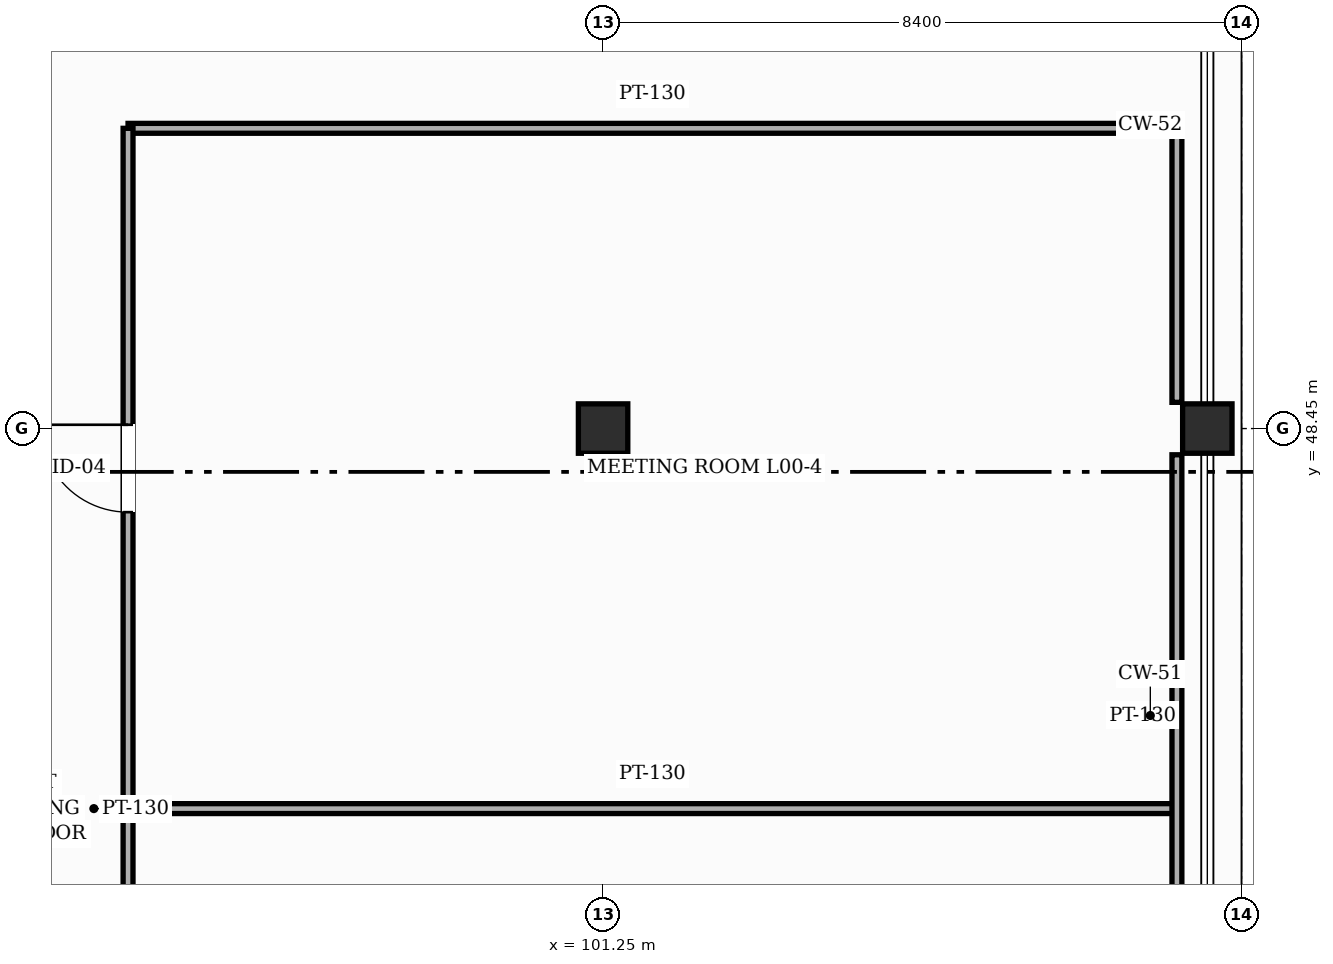
"""IFC4 building model, lengths in metres.
Left out: names, types, materials, properties, quantities, classifications, styles, units other than length and angle.
Written with IfcOpenShell. Run it as: python <this file> out.ifc"""

import sys

from ifc_helpers import new_model, si_unit, direction, frame, frame_2d, origin, origin_2d, place, context, subcontext, project, spatial, rectangle, hollow_rectangle, extrude, element, fill, save


model = new_model("IFC4")
c1 = context("Model", 3, precision=1e-05, world=origin(), true_north=direction((0.0, 1.0)))
c2 = subcontext(c1, "Body", "Model", "MODEL_VIEW")
j1 = project(units=[si_unit("LENGTHUNIT", "METRE"), si_unit("PLANEANGLEUNIT", "RADIAN")], contexts=[c1])
p1 = place(None, origin())
s1 = spatial("IfcSite", under=j1, at=p1, CompositionType="ELEMENT")
p2 = place(p1, origin())
s2 = spatial("IfcBuilding", under=s1, at=p2, CompositionType="ELEMENT")
p3 = place(p2, origin())
s3 = spatial("IfcBuildingStorey", under=s2, at=p3, CompositionType="ELEMENT", Elevation=0.0)
for number, where, z_axis, x_axis in (
    (1, (101.25, 48.45, 0.0), (0.0, 0.0, 1.0), (1.0, 0.0, 0.0)),
    (2, (109.2, 48.45, 0.0), (0.0, 0.0, 1.0), (1.0, 0.0, 0.0)),
):
    element("IfcColumn", number, at=place(p3, frame(where, z_axis=z_axis, x_axis=x_axis)), inside=s3, PredefinedType="COLUMN", context=c2, shape_type="SweptSolid", body=[
        extrude(hollow_rectangle(XDim=0.65, YDim=0.65, WallThickness=0.025, InnerFilletRadius=0.025, OuterFilletRadius=0.05, at=origin_2d()), origin(), (0.0, 0.0, 1.0), 5.4),
    ])
p4 = place(p3, frame((95.0, 43.45, 0.0), z_axis=(0.0, 0.0, 1.0), x_axis=(1.0, 0.0, 0.0)))
e3 = element("IfcWall", 3, at=p4, inside=s3, PredefinedType="PARTITIONING", context=c2, shape_type="SweptSolid", body=[
    extrude(rectangle(XDim=13.8, YDim=0.13, at=frame_2d((6.9, 0.0))), origin(), (0.0, 0.0, 1.0), 5.135),
])
p5 = place(p3, frame((95.0, 52.4, 0.0), z_axis=(0.0, 0.0, 1.0), x_axis=(1.0, 0.0, 0.0)))
e4 = element("IfcWall", 4, at=p5, inside=s3, PredefinedType="PARTITIONING", context=c2, shape_type="SweptSolid", body=[
    extrude(rectangle(XDim=13.8, YDim=0.13, at=frame_2d((6.9, 0.0))), origin(), (0.0, 0.0, 1.0), 4.725),
])
p6 = place(p3, frame((95.0, 16.6, 0.0), z_axis=(0.0, 0.0, 1.0), x_axis=(0.0, 1.0, 0.0)))
e5 = element("IfcWall", 5, at=p6, inside=s3, PredefinedType="PARTITIONING", context=c2, shape_type="SweptSolid", body=[
    extrude(rectangle(XDim=35.8, YDim=0.13, at=frame_2d((17.9, 0.0))), origin(), (0.0, 0.0, 1.0), 5.135),
])
p7 = place(p6, frame((3.9, 0.0, 0.0)))
e6 = element("IfcOpeningElement", 6, at=p7, cuts=e5, PredefinedType="OPENING", context=c2, shape_type="SweptSolid", body=[
    extrude(rectangle(XDim=1.15, YDim=2.22, at=frame_2d((0.575, 1.11))), frame((0.0, 0.075, 0.0), z_axis=(0.0, -1.0, 0.0), x_axis=(1.0, 0.0, 0.0)), (0.0, 0.0, 1.0), 0.15),
])
p8 = place(p6, frame((12.85, 0.0, 0.0)))
e7 = element("IfcOpeningElement", 7, at=p8, cuts=e5, PredefinedType="OPENING", context=c2, shape_type="SweptSolid", body=[
    extrude(rectangle(XDim=1.15, YDim=2.22, at=frame_2d((0.575, 1.11))), frame((0.0, 0.075, 0.0), z_axis=(0.0, -1.0, 0.0), x_axis=(1.0, 0.0, 0.0)), (0.0, 0.0, 1.0), 0.15),
])
p9 = place(p6, frame((21.8, 0.0, 0.0)))
e8 = element("IfcOpeningElement", 8, at=p9, cuts=e5, PredefinedType="OPENING", context=c2, shape_type="SweptSolid", body=[
    extrude(rectangle(XDim=1.15, YDim=2.22, at=frame_2d((0.575, 1.11))), frame((0.0, 0.075, 0.0), z_axis=(0.0, -1.0, 0.0), x_axis=(1.0, 0.0, 0.0)), (0.0, 0.0, 1.0), 0.15),
])
p10 = place(p6, frame((30.75, 0.0, 0.0)))
e9 = element("IfcOpeningElement", 9, at=p10, cuts=e5, PredefinedType="OPENING", context=c2, shape_type="SweptSolid", body=[
    extrude(rectangle(XDim=1.15, YDim=2.22, at=frame_2d((0.575, 1.11))), frame((0.0, 0.075, 0.0), z_axis=(0.0, -1.0, 0.0), x_axis=(1.0, 0.0, 0.0)), (0.0, 0.0, 1.0), 0.15),
])
p11 = place(p3, frame((108.8, 41.245, 0.0), z_axis=(0.0, 0.0, 1.0), x_axis=(0.0, 1.0, 0.0)))
e10 = element("IfcWall", 10, at=p11, inside=s3, PredefinedType="PARTITIONING", context=c2, shape_type="SweptSolid", body=[
    extrude(rectangle(XDim=6.86, YDim=0.13, at=frame_2d((3.43, 0.0))), origin(), (0.0, 0.0, 1.0), 5.135),
])
p12 = place(p3, frame((108.8, 48.795, 0.0), z_axis=(0.0, 0.0, 1.0), x_axis=(0.0, 1.0, 0.0)))
e11 = element("IfcWall", 11, at=p12, inside=s3, PredefinedType="PARTITIONING", context=c2, shape_type="SweptSolid", body=[
    extrude(rectangle(XDim=3.605, YDim=0.13, at=frame_2d((1.802, 0.0))), origin(), (0.0, 0.0, 1.0), 5.135),
])
p13 = place(p10, origin())
e12 = element("IfcDoor", 12, at=p13, inside=s3, OperationType="SINGLE_SWING_RIGHT", PredefinedType="DOOR", context=c2, shape_type="SweptSolid", body=[
    extrude(rectangle(XDim=1.15, YDim=2.22, at=frame_2d((0.575, 1.11))), frame((0.0, 0.025, 0.0), z_axis=(0.0, -1.0, 0.0), x_axis=(1.0, 0.0, 0.0)), (0.0, 0.0, 1.0), 0.05),
])
fill(e9, e12)
save(model, sys.argv[1])
